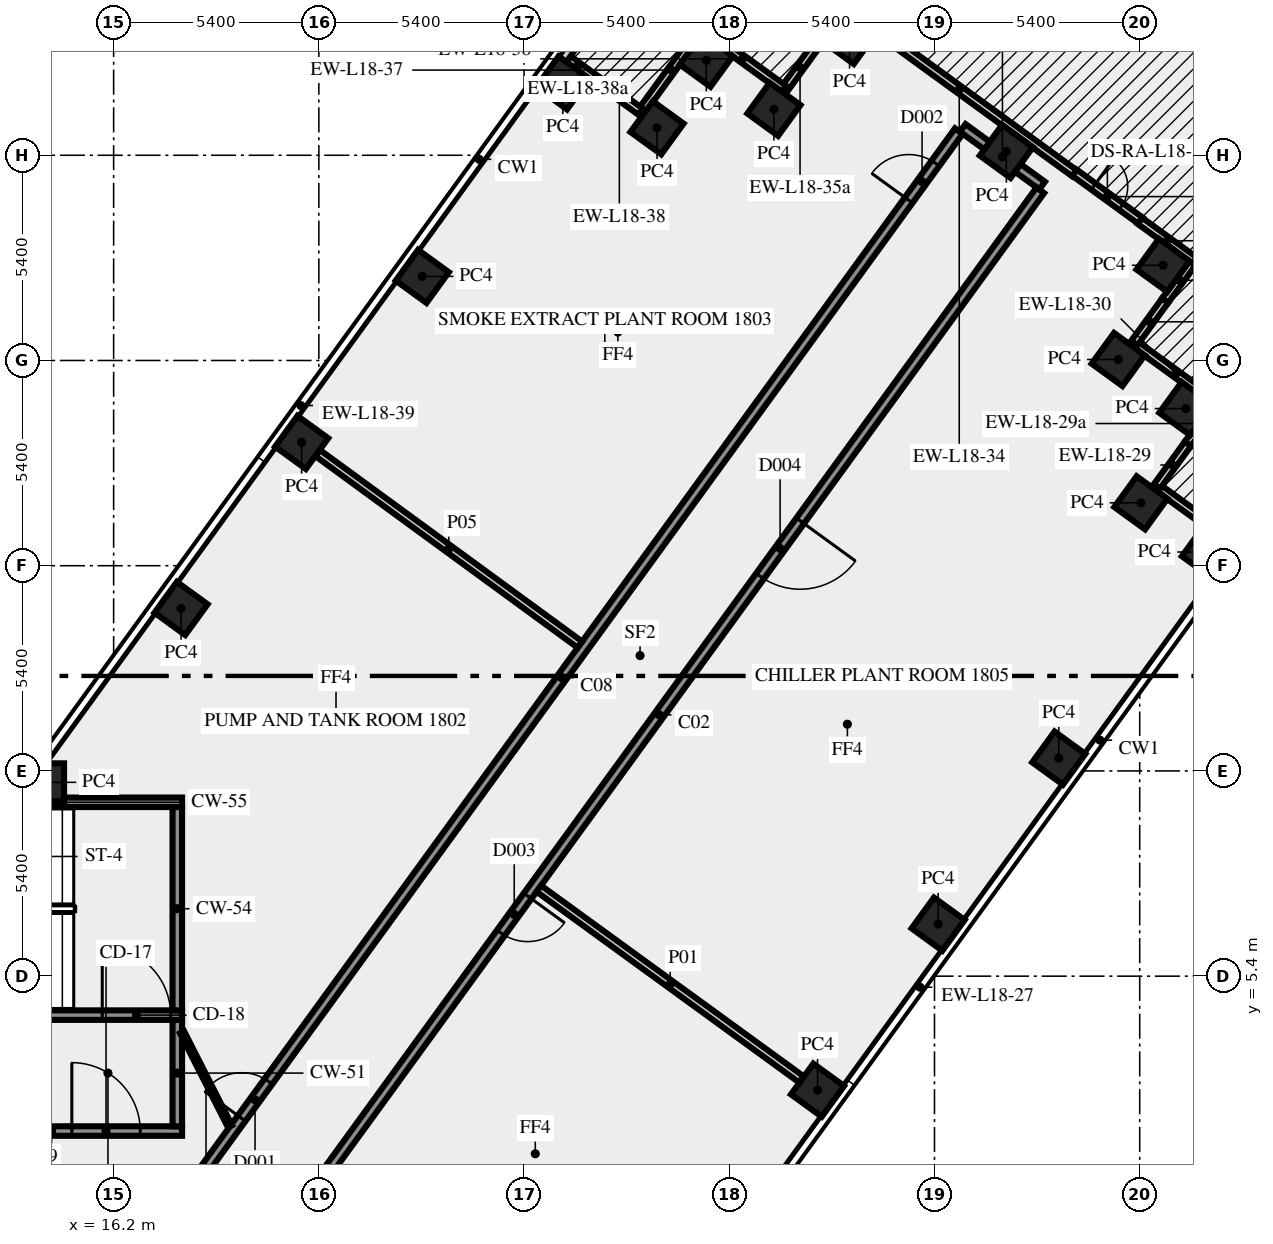
"""IFC4 building model, lengths in metres.
Left out: names, types, materials, properties, quantities, classifications, styles, units other than length and angle.
Written with IfcOpenShell. Run it as: python <this file> out.ifc"""

import sys

from ifc_helpers import new_model, si_unit, direction, frame, frame_2d, origin, origin_2d, place, context, subcontext, project, spatial, rectangle, extrude, element, fill, save


model = new_model("IFC4")
c1 = context("Model", 3, precision=1e-05, world=origin(), true_north=direction((0.0, 1.0)))
c2 = subcontext(c1, "Body", "Model", "MODEL_VIEW")
j1 = project(units=[si_unit("LENGTHUNIT", "METRE"), si_unit("PLANEANGLEUNIT", "RADIAN")], contexts=[c1])
p1 = place(None, origin())
s1 = spatial("IfcSite", under=j1, at=p1, CompositionType="ELEMENT")
p2 = place(p1, origin())
s2 = spatial("IfcBuilding", under=s1, at=p2, CompositionType="ELEMENT")
p3 = place(p2, frame((0.0, 0.0, 79.0)))
s3 = spatial("IfcBuildingStorey", under=s2, at=p3, CompositionType="ELEMENT", Elevation=79.0)
for number, where, z_axis, x_axis in (
    (1, (34.722, 2.4, 0.0), (0.0, 0.0, 1.0), (0.588, 0.809, 0.0)),
    (2, (37.896, 6.769, 0.0), (0.0, 0.0, 1.0), (0.588, 0.809, 0.0)),
    (3, (41.07, 11.137, 0.0), (0.0, 0.0, 1.0), (0.588, 0.809, 0.0)),
    (4, (45.01, 16.56, 0.0), (0.0, 0.0, 1.0), (0.588, 0.809, 0.0)),
    (5, (43.231, 17.854, 0.0), (0.0, 0.0, 1.0), (0.588, 0.809, 0.0)),
    (6, (44.415, 20.335, 0.0), (0.0, 0.0, 1.0), (0.588, 0.809, 0.0)),
    (7, (42.635, 21.626, 0.0), (0.0, 0.0, 1.0), (-0.809, 0.588, 0.0)),
    (8, (43.815, 24.105, 0.0), (0.0, 0.0, 1.0), (-0.809, 0.588, 0.0)),
    (9, (39.691, 27.102, 0.0), (0.0, 0.0, 1.0), (-0.809, 0.588, 0.0)),
    (10, (35.565, 30.1, 0.0), (0.0, 0.0, 1.0), (-0.588, -0.809, 0.0)),
    (11, (33.574, 28.209, 0.0), (0.0, 0.0, 1.0), (-0.809, 0.588, 0.0)),
    (12, (31.795, 29.5, 0.0), (0.0, 0.0, 1.0), (-0.588, -0.809, 0.0)),
    (13, (30.499, 27.723, 0.0), (0.0, 0.0, 1.0), (-0.809, 0.588, 0.0)),
    (14, (28.02, 28.905, 0.0), (0.0, 0.0, 1.0), (-0.809, 0.588, 0.0)),
    (15, (24.321, 23.812, 0.0), (0.0, 0.0, 1.0), (-0.588, -0.809, 0.0)),
    (16, (21.147, 19.444, 0.0), (0.0, 0.0, 1.0), (-0.588, -0.809, 0.0)),
    (17, (17.974, 15.075, 0.0), (0.0, 0.0, 1.0), (-0.588, -0.809, 0.0)),
    (18, (14.395, 10.5, 0.0), (0.0, 0.0, 1.0), (-1.0, 0.0, 0.0)),
):
    element("IfcColumn", number, at=place(p3, frame(where, z_axis=z_axis, x_axis=x_axis)), inside=s3, PredefinedType="COLUMN", context=c2, shape_type="SweptSolid", body=[
        extrude(rectangle(XDim=1.0, YDim=1.0, at=origin_2d()), origin(), (0.0, 0.0, 1.0), 5.65),
    ])
p4 = place(p3, frame((28.998, -6.48, 0.0), z_axis=(0.0, 0.0, 1.0), x_axis=(0.587785589252, 0.809016749559, 0.0)))
e19 = element("IfcWall", 19, at=p4, inside=s3, PredefinedType="SOLIDWALL", context=c2, shape_type="SweptSolid", body=[
    extrude(rectangle(XDim=28.654, YDim=0.2, at=frame_2d((14.327, 0.0))), origin(), (0.0, 0.0, 1.0), 5.65),
])
p5 = place(p3, frame((45.842, 16.685, 0.0), z_axis=(0.0, 0.0, 1.0), x_axis=(-0.808958916286, 0.58786518162, 0.0)))
e20 = element("IfcWall", 20, at=p5, inside=s3, PredefinedType="SOLIDWALL", context=c2, shape_type="SweptSolid", body=[
    extrude(rectangle(XDim=2.7, YDim=0.2, at=frame_2d((1.35, 0.0))), origin(), (0.0, 0.0, 1.0), 5.65),
])
p6 = place(p3, frame((43.656, 18.289, 0.0), z_axis=(0.0, 0.0, 1.0), x_axis=(0.58786788786, 0.808956949672, 0.0)))
e21 = element("IfcWall", 21, at=p6, inside=s3, PredefinedType="SOLIDWALL", context=c2, shape_type="SweptSolid", body=[
    extrude(rectangle(XDim=1.386, YDim=0.2, at=frame_2d((0.693, 0.0))), origin(), (0.0, 0.0, 1.0), 4.15),
])
p7 = place(p3, frame((44.47, 19.41, 0.0), z_axis=(0.0, 0.0, 1.0), x_axis=(0.587652369972, 0.809113522361, 0.0)))
e22 = element("IfcWall", 22, at=p7, inside=s3, PredefinedType="SOLIDWALL", context=c2, shape_type="SweptSolid", body=[
    extrude(rectangle(XDim=1.314, YDim=0.2, at=frame_2d((0.657, 0.0))), origin(), (0.0, 0.0, 1.0), 5.65),
])
p8 = place(p3, frame((45.245, 20.456, 0.0), z_axis=(0.0, 0.0, 1.0), x_axis=(-0.809033161865, 0.587762999008, 0.0)))
e23 = element("IfcWall", 23, at=p8, inside=s3, PredefinedType="SOLIDWALL", context=c2, shape_type="SweptSolid", body=[
    extrude(rectangle(XDim=2.7, YDim=0.2, at=frame_2d((1.35, 0.0))), origin(), (0.0, 0.0, 1.0), 5.65),
])
p9 = place(p3, frame((43.058, 22.06, 0.0), z_axis=(0.0, 0.0, 1.0), x_axis=(0.587845576324, 0.808973162964, 0.0)))
e24 = element("IfcWall", 24, at=p9, inside=s3, PredefinedType="SOLIDWALL", context=c2, shape_type="SweptSolid", body=[
    extrude(rectangle(XDim=1.38, YDim=0.2, at=frame_2d((0.69, 0.0))), origin(), (0.0, 0.0, 1.0), 4.15),
])
p10 = place(p3, frame((43.869, 23.176, 0.0), z_axis=(0.0, 0.0, 1.0), x_axis=(0.587797718958, 0.809007936665, 0.0)))
e25 = element("IfcWall", 25, at=p10, inside=s3, PredefinedType="SOLIDWALL", context=c2, shape_type="SweptSolid", body=[
    extrude(rectangle(XDim=1.32, YDim=0.2, at=frame_2d((0.66, 0.0))), origin(), (0.0, 0.0, 1.0), 5.65),
])
p11 = place(p3, frame((44.648, 24.227, 0.0), z_axis=(0.0, 0.0, 1.0), x_axis=(-0.808955331464, 0.587870114648, 0.0)))
e26 = element("IfcWall", 26, at=p11, inside=s3, PredefinedType="SOLIDWALL", context=c2, shape_type="SweptSolid", body=[
    extrude(rectangle(XDim=1.781, YDim=0.2, at=frame_2d((0.891, 0.0))), origin(), (0.0, 0.0, 1.0), 5.65),
])
p12 = place(p3, frame((41.485, 26.541, 0.0), z_axis=(0.0, 0.0, 1.0), x_axis=(0.809022465264, -0.587777722186, 0.0)))
e27 = element("IfcWall", 27, at=p12, inside=s3, PredefinedType="SOLIDWALL", context=c2, shape_type="SweptSolid", body=[
    extrude(rectangle(XDim=2.137, YDim=0.2, at=frame_2d((1.069, 0.0))), origin(), (0.0, 0.0, 1.0), 5.65),
])
p13 = place(p12, frame((0.619, 0.0, 0.0)))
e28 = element("IfcOpeningElement", 28, at=p13, cuts=e27, PredefinedType="OPENING", context=c2, shape_type="SweptSolid", body=[
    extrude(rectangle(XDim=0.9, YDim=2.1, at=frame_2d((0.45, 1.05))), frame((0.0, 0.11, 0.0), z_axis=(0.0, -1.0, 0.0), x_axis=(1.0, 0.0, 0.0)), (0.0, 0.0, 1.0), 0.22),
])
p14 = place(p3, frame((41.477, 26.531, 0.0), z_axis=(0.0, 0.0, 1.0), x_axis=(-0.809001309088, 0.587806840633, 0.0)))
e29 = element("IfcWall", 29, at=p14, inside=s3, PredefinedType="SOLIDWALL", context=c2, shape_type="SweptSolid", body=[
    extrude(rectangle(XDim=7.481, YDim=0.2, at=frame_2d((3.741, 0.0))), origin(), (0.0, 0.0, 1.0), 5.65),
])
p15 = place(p3, frame((34.67, 29.868, 0.0), z_axis=(0.0, 0.0, 1.0), x_axis=(-0.587847138415, -0.808972027858, 0.0)))
e30 = element("IfcWall", 30, at=p15, inside=s3, PredefinedType="SOLIDWALL", context=c2, shape_type="SweptSolid", body=[
    extrude(rectangle(XDim=1.387, YDim=0.2, at=frame_2d((0.693, 0.0))), origin(), (0.0, 0.0, 1.0), 4.15),
])
for number, where, z_axis, x_axis in (
    (31, (33.838, 28.744, 0.0), (0.0, 0.0, 1.0), (-0.809, 0.588, 0.0)),
    (32, (31.67, 30.333, 0.0), (0.0, 0.0, 1.0), (-0.588, -0.809, 0.0)),
):
    element("IfcWall", number, at=place(p3, frame(where, z_axis=z_axis, x_axis=x_axis)), inside=s3, PredefinedType="SOLIDWALL", context=c2, shape_type="SweptSolid", body=[
        extrude(rectangle(XDim=2.7, YDim=0.2, at=frame_2d((1.35, 0.0))), origin(), (0.0, 0.0, 1.0), 5.65),
    ])
p16 = place(p3, frame((30.067, 28.146, 0.0), z_axis=(0.0, 0.0, 1.0), x_axis=(-0.809003403559, 0.587803957991, 0.0)))
e33 = element("IfcWall", 33, at=p16, inside=s3, PredefinedType="SOLIDWALL", context=c2, shape_type="SweptSolid", body=[
    extrude(rectangle(XDim=1.382, YDim=0.2, at=frame_2d((0.691, 0.0))), origin(), (0.0, 0.0, 1.0), 4.15),
])
p17 = place(p3, frame((28.949, 28.959, 0.0), z_axis=(0.0, 0.0, 1.0), x_axis=(-0.809064357795, 0.587720056613, 0.0)))
e34 = element("IfcWall", 34, at=p17, inside=s3, PredefinedType="SOLIDWALL", context=c2, shape_type="SweptSolid", body=[
    extrude(rectangle(XDim=1.318, YDim=0.2, at=frame_2d((0.659, 0.0))), origin(), (0.0, 0.0, 1.0), 5.65),
])
p18 = place(p3, frame((27.899, 29.736, 0.0), z_axis=(0.0, 0.0, 1.0), x_axis=(-0.587790518608, -0.809013168147, 0.0)))
e35 = element("IfcWall", 35, at=p18, inside=s3, PredefinedType="SOLIDWALL", context=c2, shape_type="SweptSolid", body=[
    extrude(rectangle(XDim=23.044, YDim=0.2, at=frame_2d((11.522, 0.0))), origin(), (0.0, 0.0, 1.0), 5.65),
])
p19 = place(p3, frame((28.001, 29.514, 0.0), z_axis=(0.0, 0.0, 1.0), x_axis=(0.587788703145, 0.809014487172, 0.0)))
e36 = element("IfcWall", 36, at=p19, inside=s3, PredefinedType="PARAPET", context=c2, shape_type="SweptSolid", body=[
    extrude(rectangle(XDim=15.77, YDim=0.25, at=frame_2d((7.885, 0.0))), origin(), (0.0, 0.0, 1.0), 1.1),
])
p20 = place(p3, frame((14.1, 1.325, 0.0), z_axis=(0.0, 0.0, 1.0), x_axis=(1.0, 0.0, 0.0)))
e37 = element("IfcWall", 37, at=p20, inside=s3, PredefinedType="SHEAR", context=c2, shape_type="SweptSolid", body=[
    extrude(rectangle(XDim=3.9, YDim=0.25, at=frame_2d((1.95, 0.0))), origin(), (0.0, 0.0, 1.0), 5.65),
])
p21 = place(p20, frame((1.0, 0.0, 0.0)))
e38 = element("IfcOpeningElement", 38, at=p21, cuts=e37, PredefinedType="OPENING", context=c2, shape_type="SweptSolid", body=[
    extrude(rectangle(XDim=1.8, YDim=2.1, at=frame_2d((0.9, 1.05))), frame((0.0, 0.135, 0.0), z_axis=(0.0, -1.0, 0.0), x_axis=(1.0, 0.0, 0.0)), (0.0, 0.0, 1.0), 0.27),
])
p22 = place(p3, frame((17.875, 1.45, 0.0), z_axis=(0.0, 0.0, 1.0), x_axis=(0.0, 1.0, 0.0)))
e39 = element("IfcWall", 39, at=p22, inside=s3, PredefinedType="SHEAR", context=c2, shape_type="SweptSolid", body=[
    extrude(rectangle(XDim=2.8, YDim=0.25, at=frame_2d((1.4, 0.0))), origin(), (0.0, 0.0, 1.0), 5.65),
])
p23 = place(p3, frame((7.5, 4.375, 0.0), z_axis=(0.0, 0.0, 1.0), x_axis=(1.0, 0.0, 0.0)))
e40 = element("IfcWall", 40, at=p23, inside=s3, PredefinedType="SHEAR", context=c2, shape_type="SweptSolid", body=[
    extrude(rectangle(XDim=10.5, YDim=0.25, at=frame_2d((5.25, 0.0))), origin(), (0.0, 0.0, 1.0), 5.65),
])
p24 = place(p23, frame((8.4, 0.0, 0.0)))
e41 = element("IfcOpeningElement", 41, at=p24, cuts=e40, PredefinedType="OPENING", context=c2, shape_type="SweptSolid", body=[
    extrude(rectangle(XDim=1.8, YDim=2.1, at=frame_2d((0.9, 1.05))), frame((0.0, 0.135, 0.0), z_axis=(0.0, -1.0, 0.0), x_axis=(1.0, 0.0, 0.0)), (0.0, 0.0, 1.0), 0.27),
])
p25 = place(p3, frame((17.875, 4.5, 0.0), z_axis=(0.0, 0.0, 1.0), x_axis=(0.0, 1.0, 0.0)))
e42 = element("IfcWall", 42, at=p25, inside=s3, PredefinedType="SHEAR", context=c2, shape_type="SweptSolid", body=[
    extrude(rectangle(XDim=5.35, YDim=0.25, at=frame_2d((2.675, 0.0))), origin(), (0.0, 0.0, 1.0), 5.65),
])
p26 = place(p3, frame((7.5, 9.975, 0.0), z_axis=(0.0, 0.0, 1.0), x_axis=(1.0, 0.0, 0.0)))
e43 = element("IfcWall", 43, at=p26, inside=s3, PredefinedType="SHEAR", context=c2, shape_type="SweptSolid", body=[
    extrude(rectangle(XDim=10.5, YDim=0.25, at=frame_2d((5.25, 0.0))), origin(), (0.0, 0.0, 1.0), 5.65),
])
p27 = place(p26, frame((2.0, 0.0, 1.0)))
e44 = element("IfcOpeningElement", 44, at=p27, cuts=e43, PredefinedType="OPENING", context=c2, shape_type="SweptSolid", body=[
    extrude(rectangle(XDim=1.2, YDim=1.2, at=frame_2d((0.6, 0.6))), frame((0.0, 0.135, 0.0), z_axis=(0.0, -1.0, 0.0), x_axis=(1.0, 0.0, 0.0)), (0.0, 0.0, 1.0), 0.27),
])
p28 = place(p3, frame((38.543, 27.719, 0.0), z_axis=(0.0, 0.0, 1.0), x_axis=(0.809038456977, -0.58775571042, 0.0)))
e45 = element("IfcWall", 45, at=p28, inside=s3, PredefinedType="SOLIDWALL", context=c2, shape_type="SweptSolid", body=[
    extrude(rectangle(XDim=2.583, YDim=0.25, at=frame_2d((1.292, 0.0))), origin(), (0.0, 0.0, 1.0), 5.65),
])
p29 = place(p3, frame((40.584, 26.078, 0.0), z_axis=(0.0, 0.0, 1.0), x_axis=(-0.587782727964, -0.809018828401, 0.0)))
e46 = element("IfcWall", 46, at=p29, inside=s3, PredefinedType="SOLIDWALL", context=c2, shape_type="SweptSolid", body=[
    extrude(rectangle(XDim=34.117, YDim=0.25, at=frame_2d((17.058, 0.0))), origin(), (0.0, 0.0, 1.0), 5.65),
])
p30 = place(p29, frame((22.951, 0.0, 0.0)))
e47 = element("IfcOpeningElement", 47, at=p30, cuts=e46, PredefinedType="OPENING", context=c2, shape_type="SweptSolid", body=[
    extrude(rectangle(XDim=1.2, YDim=2.1, at=frame_2d((0.6, 1.05))), frame((0.0, 0.135, 0.0), z_axis=(0.0, -1.0, 0.0), x_axis=(1.0, 0.0, 0.0)), (0.0, 0.0, 1.0), 0.27),
])
p31 = place(p29, frame((10.749, 0.0, 0.0)))
e48 = element("IfcOpeningElement", 48, at=p31, cuts=e46, PredefinedType="OPENING", context=c2, shape_type="SweptSolid", body=[
    extrude(rectangle(XDim=1.8, YDim=2.1, at=frame_2d((0.9, 1.05))), frame((0.0, 0.135, 0.0), z_axis=(0.0, -1.0, 0.0), x_axis=(1.0, 0.0, 0.0)), (0.0, 0.0, 1.0), 0.27),
])
p32 = place(p3, frame((17.545, -1.125, 0.0), z_axis=(0.0, 0.0, 1.0), x_axis=(0.587787785895, 0.809015153599, 0.0)))
e49 = element("IfcWall", 49, at=p32, inside=s3, PredefinedType="SOLIDWALL", context=c2, shape_type="SweptSolid", body=[
    extrude(rectangle(XDim=35.549, YDim=0.25, at=frame_2d((17.775, 0.0))), origin(), (0.0, 0.0, 1.0), 5.65),
])
p33 = place(p32, frame((33.303, 0.0, 0.0)))
e50 = element("IfcOpeningElement", 50, at=p33, cuts=e49, PredefinedType="OPENING", context=c2, shape_type="SweptSolid", body=[
    extrude(rectangle(XDim=1.2, YDim=2.1, at=frame_2d((0.6, 1.05))), frame((0.0, 0.135, 0.0), z_axis=(0.0, -1.0, 0.0), x_axis=(1.0, 0.0, 0.0)), (0.0, 0.0, 1.0), 0.27),
])
p34 = place(p32, frame((3.442, 0.0, 0.0)))
e51 = element("IfcOpeningElement", 51, at=p34, cuts=e49, PredefinedType="OPENING", context=c2, shape_type="SweptSolid", body=[
    extrude(rectangle(XDim=1.2, YDim=2.1, at=frame_2d((0.6, 1.05))), frame((0.0, 0.135, 0.0), z_axis=(0.0, -1.0, 0.0), x_axis=(1.0, 0.0, 0.0)), (0.0, 0.0, 1.0), 0.27),
])
p35 = place(p3, frame((34.302, 2.681, 0.0), z_axis=(0.0, 0.0, 1.0), x_axis=(-0.809031283368, 0.587765584678, 0.0)))
e52 = element("IfcWall", 52, at=p35, inside=s3, PredefinedType="SOLIDWALL", context=c2, shape_type="SweptSolid", body=[
    extrude(rectangle(XDim=8.545, YDim=0.2, at=frame_2d((4.272, 0.0))), origin(), (0.0, 0.0, 1.0), 5.65),
])
p36 = place(p3, frame((21.569, 19.164, 0.0), z_axis=(0.0, 0.0, 1.0), x_axis=(0.807519877432, -0.589840357684, 0.0)))
e53 = element("IfcWall", 53, at=p36, inside=s3, PredefinedType="SOLIDWALL", context=c2, shape_type="SweptSolid", body=[
    extrude(rectangle(XDim=8.545, YDim=0.2, at=frame_2d((4.272, 0.0))), origin(), (0.0, 0.0, 1.0), 5.65),
])
p37 = place(p3, frame((18.0, 3.925, 0.0), z_axis=(0.0, 0.0, 1.0), x_axis=(0.453950796792, -0.891026752736, 0.0)))
e54 = element("IfcWall", 54, at=p37, inside=s3, PredefinedType="PARTITIONING", context=c2, shape_type="SweptSolid", body=[
    extrude(rectangle(XDim=2.778, YDim=0.12, at=frame_2d((1.389, 0.0))), origin(), (0.0, 0.0, 1.0), 5.65),
])
p38 = place(p13, origin())
e55 = element("IfcDoor", 55, at=p38, inside=s3, OperationType="SINGLE_SWING_RIGHT", PredefinedType="DOOR", context=c2, shape_type="SweptSolid", body=[
    extrude(rectangle(XDim=0.9, YDim=2.1, at=frame_2d((0.45, 1.05))), frame((0.0, 0.025, 0.0), z_axis=(0.0, -1.0, 0.0), x_axis=(1.0, 0.0, 0.0)), (0.0, 0.0, 1.0), 0.05),
])
fill(e28, e55)
p39 = place(p21, origin())
e56 = element("IfcDoor", 56, at=p39, inside=s3, OperationType="DOUBLE_DOOR_SINGLE_SWING", PredefinedType="DOOR", context=c2, shape_type="SweptSolid", body=[
    extrude(rectangle(XDim=1.8, YDim=2.1, at=frame_2d((0.9, 1.05))), frame((0.0, 0.025, 0.0), z_axis=(0.0, -1.0, 0.0), x_axis=(1.0, 0.0, 0.0)), (0.0, 0.0, 1.0), 0.05),
])
fill(e38, e56)
p40 = place(p24, origin())
e57 = element("IfcDoor", 57, at=p40, inside=s3, OperationType="DOUBLE_DOOR_SINGLE_SWING", PredefinedType="DOOR", context=c2, shape_type="SweptSolid", body=[
    extrude(rectangle(XDim=1.8, YDim=2.1, at=frame_2d((0.9, 1.05))), frame((0.0, 0.025, 0.0), z_axis=(0.0, -1.0, 0.0), x_axis=(1.0, 0.0, 0.0)), (0.0, 0.0, 1.0), 0.05),
])
fill(e41, e57)
p41 = place(p30, origin())
e58 = element("IfcDoor", 58, at=p41, inside=s3, OperationType="SINGLE_SWING_LEFT", PredefinedType="DOOR", context=c2, shape_type="SweptSolid", body=[
    extrude(rectangle(XDim=1.2, YDim=2.1, at=frame_2d((0.6, 1.05))), frame((0.0, 0.025, 0.0), z_axis=(0.0, -1.0, 0.0), x_axis=(1.0, 0.0, 0.0)), (0.0, 0.0, 1.0), 0.05),
])
fill(e47, e58)
p42 = place(p31, origin())
e59 = element("IfcDoor", 59, at=p42, inside=s3, OperationType="DOUBLE_DOOR_SINGLE_SWING", PredefinedType="DOOR", context=c2, shape_type="SweptSolid", body=[
    extrude(rectangle(XDim=1.8, YDim=2.1, at=frame_2d((0.9, 1.05))), frame((0.0, 0.025, 0.0), z_axis=(0.0, -1.0, 0.0), x_axis=(1.0, 0.0, 0.0)), (0.0, 0.0, 1.0), 0.05),
])
fill(e48, e59)
p43 = place(p33, origin())
e60 = element("IfcDoor", 60, at=p43, inside=s3, OperationType="SINGLE_SWING_RIGHT", PredefinedType="DOOR", context=c2, shape_type="SweptSolid", body=[
    extrude(rectangle(XDim=1.2, YDim=2.1, at=frame_2d((0.6, 1.05))), frame((0.0, 0.025, 0.0), z_axis=(0.0, -1.0, 0.0), x_axis=(1.0, 0.0, 0.0)), (0.0, 0.0, 1.0), 0.05),
])
fill(e50, e60)
p44 = place(p34, origin())
e61 = element("IfcDoor", 61, at=p44, inside=s3, OperationType="SINGLE_SWING_LEFT", PredefinedType="DOOR", context=c2, shape_type="SweptSolid", body=[
    extrude(rectangle(XDim=1.2, YDim=2.1, at=frame_2d((0.6, 1.05))), frame((0.0, 0.025, 0.0), z_axis=(0.0, -1.0, 0.0), x_axis=(1.0, 0.0, 0.0)), (0.0, 0.0, 1.0), 0.05),
])
fill(e51, e61)
save(model, sys.argv[1])
